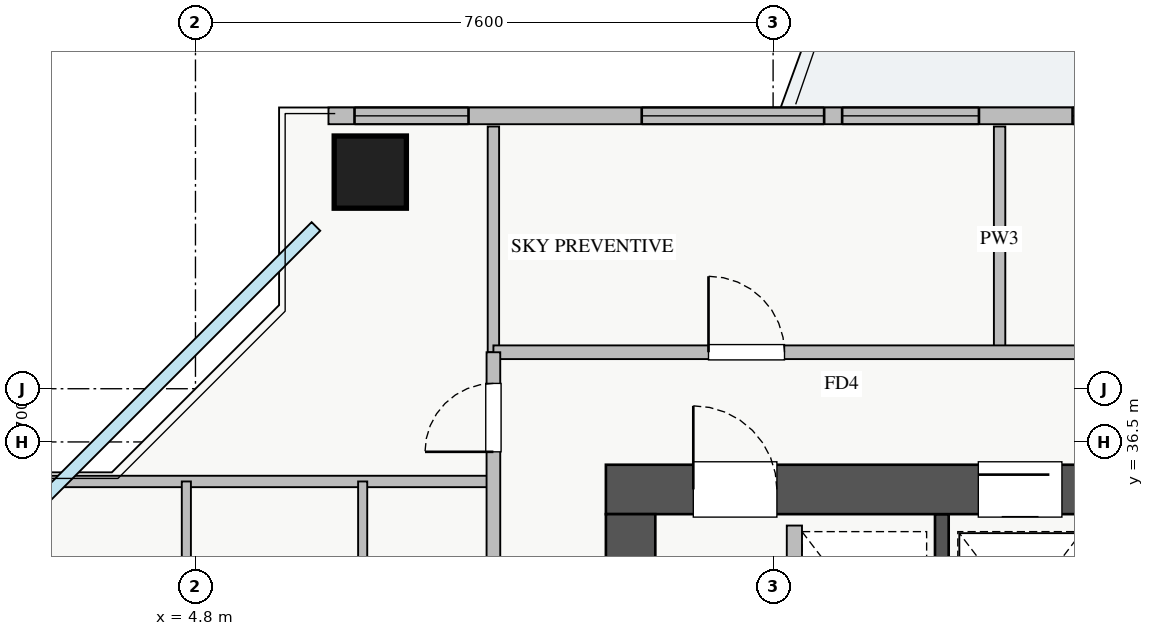
"""IFC4 building model, lengths in metres.
Left out: names, types, materials, properties, quantities, classifications, styles, units other than length and angle.
Written with IfcOpenShell. Run it as: python <this file> out.ifc"""

import sys

from ifc_helpers import new_model, si_unit, direction, frame, frame_2d, origin, origin_2d, place, context, subcontext, project, spatial, rectangle, extrude, source, transform, mapped, element, fill, save


model = new_model("IFC4")
c1 = context("Model", 3, precision=1e-05, world=origin(), true_north=direction((0.0, 1.0)))
c2 = subcontext(c1, "Body", "Model", "MODEL_VIEW")
j1 = project(units=[si_unit("LENGTHUNIT", "METRE"), si_unit("PLANEANGLEUNIT", "RADIAN")], contexts=[c1])
p1 = place(None, origin())
s1 = spatial("IfcSite", under=j1, at=p1, CompositionType="ELEMENT")
p2 = place(p1, origin())
s2 = spatial("IfcBuilding", under=s1, at=p2, CompositionType="ELEMENT")
p3 = place(p2, frame((0.0, 0.0, 179.5)))
s3 = spatial("IfcBuildingStorey", under=s2, at=p3, CompositionType="ELEMENT", Elevation=179.5)
p4 = place(p3, frame((14.62, 33.2, 0.0), z_axis=(0.0, 0.0, 1.0), x_axis=(0.0, 1.0, 0.0)))
e1 = element("IfcWall", 1, at=p4, inside=s3, PredefinedType="SHEAR", context=c2, shape_type="SweptSolid", body=[
    extrude(rectangle(XDim=2.35, YDim=0.18, at=frame_2d((1.175, 0.0))), origin(), (0.0, 0.0, 1.0), 3.07),
])
p5 = place(p3, frame((10.2, 35.875, 0.0), z_axis=(0.0, 0.0, 1.0), x_axis=(1.0, 0.0, 0.0)))
e2 = element("IfcWall", 2, at=p5, inside=s3, PredefinedType="SHEAR", context=c2, shape_type="SweptSolid", body=[
    extrude(rectangle(XDim=17.6, YDim=0.65, at=frame_2d((8.8, 0.0))), origin(), (0.0, 0.0, 1.0), 3.25),
])
p6 = place(p5, frame((1.15, 0.0, 0.0)))
e3 = element("IfcOpeningElement", 3, at=p6, cuts=e2, PredefinedType="OPENING", context=c2, shape_type="SweptSolid", body=[
    extrude(rectangle(XDim=1.1, YDim=2.05, at=frame_2d((0.55, 1.025))), frame((0.0, 0.335, 0.0), z_axis=(0.0, -1.0, 0.0), x_axis=(1.0, 0.0, 0.0)), (0.0, 0.0, 1.0), 0.67),
])
p7 = place(p5, frame((8.3, 0.0, 0.0)))
e4 = element("IfcOpeningElement", 4, at=p7, cuts=e2, PredefinedType="OPENING", context=c2, shape_type="SweptSolid", body=[
    extrude(rectangle(XDim=1.1, YDim=2.05, at=frame_2d((0.55, 1.025))), frame((0.0, 0.335, 0.0), z_axis=(0.0, -1.0, 0.0), x_axis=(1.0, 0.0, 0.0)), (0.0, 0.0, 1.0), 0.67),
])
p8 = place(p5, frame((4.9, 0.0, 0.0)))
e5 = element("IfcOpeningElement", 5, at=p8, cuts=e2, PredefinedType="OPENING", context=c2, shape_type="SweptSolid", body=[
    extrude(rectangle(XDim=1.1, YDim=2.05, at=frame_2d((0.55, 1.025))), frame((0.0, 0.335, 0.0), z_axis=(0.0, -1.0, 0.0), x_axis=(1.0, 0.0, 0.0)), (0.0, 0.0, 1.0), 0.67),
])
p9 = place(p5, frame((14.74, 0.0, 0.0)))
e6 = element("IfcOpeningElement", 6, at=p9, cuts=e2, PredefinedType="OPENING", context=c2, shape_type="SweptSolid", body=[
    extrude(rectangle(XDim=1.0, YDim=2.05, at=frame_2d((0.5, 1.025))), frame((0.0, 0.335, 0.0), z_axis=(0.0, -1.0, 0.0), x_axis=(1.0, 0.0, 0.0)), (0.0, 0.0, 1.0), 0.67),
])
p10 = place(p5, frame((10.25, 0.0, 0.0)))
e7 = element("IfcOpeningElement", 7, at=p10, cuts=e2, PredefinedType="OPENING", context=c2, shape_type="SweptSolid", body=[
    extrude(rectangle(XDim=1.0, YDim=2.05, at=frame_2d((0.5, 1.025))), frame((0.0, 0.335, 0.0), z_axis=(0.0, -1.0, 0.0), x_axis=(1.0, 0.0, 0.0)), (0.0, 0.0, 1.0), 0.67),
])
p11 = place(p5, frame((12.7, 0.0, 0.0)))
e8 = element("IfcOpeningElement", 8, at=p11, cuts=e2, PredefinedType="OPENING", context=c2, shape_type="SweptSolid", body=[
    extrude(rectangle(XDim=1.0, YDim=2.05, at=frame_2d((0.5, 1.025))), frame((0.0, 0.335, 0.0), z_axis=(0.0, -1.0, 0.0), x_axis=(1.0, 0.0, 0.0)), (0.0, 0.0, 1.0), 0.67),
])
p12 = place(p3, frame((10.525, 29.65, 0.0), z_axis=(0.0, 0.0, 1.0), x_axis=(0.0, 1.0, 0.0)))
e9 = element("IfcWall", 9, at=p12, inside=s3, PredefinedType="SHEAR", context=c2, shape_type="SweptSolid", body=[
    extrude(rectangle(XDim=5.9, YDim=0.65, at=frame_2d((2.95, 0.0))), origin(), (0.0, 0.0, 1.0), 3.25),
])
m1 = source(origin(), c2, "Body", "SweptSolid", [
    extrude(rectangle(XDim=0.95, YDim=0.95, at=origin_2d()), origin(), (0.0, 0.0, 1.0), 3.25),
])
p13 = place(p3, frame((7.1, 40.05, 0.0), z_axis=(0.0, 0.0, 1.0), x_axis=(1.0, 0.0, 0.0)))
e10 = element("IfcColumn", 10, at=p13, inside=s3, PredefinedType="COLUMN", context=c2, shape_type="MappedRepresentation", body=[
    mapped(m1, transform((0.0, 0.0, 0.0), x_axis=(1.0, 0.0, 0.0), y_axis=(0.0, 1.0, 0.0), z_axis=(0.0, 0.0, 1.0), scale=1.0)),
])
p14 = place(p3, frame((6.55, 40.79, 0.0), z_axis=(0.0, 0.0, 1.0), x_axis=(1.0, 0.0, 0.0)))
e11 = element("IfcWall", 11, at=p14, inside=s3, PredefinedType="STANDARD", context=c2, shape_type="SweptSolid", body=[
    extrude(rectangle(XDim=24.9, YDim=0.22, at=frame_2d((12.45, 0.0))), origin(), (0.0, 0.0, 1.0), 2.61),
])
p15 = place(p14, frame((13.3, 0.0, 0.0)))
e12 = element("IfcOpeningElement", 12, at=p15, cuts=e11, PredefinedType="OPENING", context=c2, shape_type="SweptSolid", body=[
    extrude(rectangle(XDim=1.2, YDim=2.1, at=frame_2d((0.6, 1.05))), frame((0.0, 0.12, 0.0), z_axis=(0.0, -1.0, 0.0), x_axis=(1.0, 0.0, 0.0)), (0.0, 0.0, 1.0), 0.24),
])
p16 = place(p14, frame((0.343, 0.0, 0.9)))
e13 = element("IfcOpeningElement", 13, at=p16, cuts=e11, PredefinedType="OPENING", context=c2, shape_type="SweptSolid", body=[
    extrude(rectangle(XDim=1.5, YDim=1.5, at=frame_2d((0.75, 0.75))), frame((0.0, 0.12, 0.0), z_axis=(0.0, -1.0, 0.0), x_axis=(1.0, 0.0, 0.0)), (0.0, 0.0, 1.0), 0.24),
])
p17 = place(p14, frame((9.79, 0.0, 0.9)))
e14 = element("IfcOpeningElement", 14, at=p17, cuts=e11, PredefinedType="OPENING", context=c2, shape_type="SweptSolid", body=[
    extrude(rectangle(XDim=1.8, YDim=1.5, at=frame_2d((0.9, 0.75))), frame((0.0, 0.12, 0.0), z_axis=(0.0, -1.0, 0.0), x_axis=(1.0, 0.0, 0.0)), (0.0, 0.0, 1.0), 0.24),
])
p18 = place(p14, frame((14.813, 0.0, 0.9)))
e15 = element("IfcOpeningElement", 15, at=p18, cuts=e11, PredefinedType="OPENING", context=c2, shape_type="SweptSolid", body=[
    extrude(rectangle(XDim=1.5, YDim=1.45, at=frame_2d((0.75, 0.725))), frame((0.0, 0.12, 0.0), z_axis=(0.0, -1.0, 0.0), x_axis=(1.0, 0.0, 0.0)), (0.0, 0.0, 1.0), 0.24),
])
p19 = place(p14, frame((20.738, 0.0, 0.9)))
e16 = element("IfcOpeningElement", 16, at=p19, cuts=e11, PredefinedType="OPENING", context=c2, shape_type="SweptSolid", body=[
    extrude(rectangle(XDim=2.1, YDim=1.48, at=frame_2d((1.05, 0.74))), frame((0.0, 0.12, 0.0), z_axis=(0.0, -1.0, 0.0), x_axis=(1.0, 0.0, 0.0)), (0.0, 0.0, 1.0), 0.24),
])
p20 = place(p14, frame((4.122, 0.0, 0.9)))
e17 = element("IfcOpeningElement", 17, at=p20, cuts=e11, PredefinedType="OPENING", context=c2, shape_type="SweptSolid", body=[
    extrude(rectangle(XDim=2.4, YDim=1.5, at=frame_2d((1.2, 0.75))), frame((0.0, 0.12, 0.0), z_axis=(0.0, -1.0, 0.0), x_axis=(1.0, 0.0, 0.0)), (0.0, 0.0, 1.0), 0.24),
])
p21 = place(p14, frame((6.758, 0.0, 0.9)))
e18 = element("IfcOpeningElement", 18, at=p21, cuts=e11, PredefinedType="OPENING", context=c2, shape_type="SweptSolid", body=[
    extrude(rectangle(XDim=1.8, YDim=1.5, at=frame_2d((0.9, 0.75))), frame((0.0, 0.12, 0.0), z_axis=(0.0, -1.0, 0.0), x_axis=(1.0, 0.0, 0.0)), (0.0, 0.0, 1.0), 0.24),
])
p22 = place(p3, frame((12.68, 33.19, 0.0), z_axis=(0.0, 0.0, 1.0), x_axis=(0.0, 1.0, 0.0)))
e19 = element("IfcWall", 19, at=p22, inside=s3, PredefinedType="PARTITIONING", context=c2, shape_type="SweptSolid", body=[
    extrude(rectangle(XDim=2.21, YDim=0.2, at=frame_2d((1.105, 0.0))), origin(), (0.0, 0.0, 1.0), 3.07),
])
for number, where, z_axis, x_axis in (
    (20, (15.38, 37.68, 0.0), (0.0, 0.0, 1.0), (0.0, 1.0, 0.0)),
    (21, (8.72, 37.68, 0.0), (0.0, 0.0, 1.0), (0.0, 1.0, 0.0)),
):
    element("IfcWall", number, at=place(p3, frame(where, z_axis=z_axis, x_axis=x_axis)), inside=s3, PredefinedType="PARTITIONING", context=c2, shape_type="SweptSolid", body=[
        extrude(rectangle(XDim=2.97, YDim=0.15, at=frame_2d((1.485, 0.0))), origin(), (0.0, 0.0, 1.0), 3.07),
    ])
p23 = place(p3, frame((8.72, 37.68, 0.0), z_axis=(0.0, 0.0, 1.0), x_axis=(1.0, 0.0, 0.0)))
e22 = element("IfcWall", 22, at=p23, inside=s3, PredefinedType="PARTITIONING", context=c2, shape_type="SweptSolid", body=[
    extrude(rectangle(XDim=23.63, YDim=0.18, at=frame_2d((11.815, 0.0))), origin(), (0.0, 0.0, 1.0), 3.07),
])
p24 = place(p23, frame((2.83, 0.0, 0.0)))
e23 = element("IfcOpeningElement", 23, at=p24, cuts=e22, PredefinedType="OPENING", context=c2, shape_type="SweptSolid", body=[
    extrude(rectangle(XDim=1.0, YDim=2.05, at=frame_2d((0.5, 1.025))), frame((0.0, 0.1, 0.0), z_axis=(0.0, -1.0, 0.0), x_axis=(1.0, 0.0, 0.0)), (0.0, 0.0, 1.0), 0.2),
])
p25 = place(p23, frame((8.02, 0.0, 0.0)))
e24 = element("IfcOpeningElement", 24, at=p25, cuts=e22, PredefinedType="OPENING", context=c2, shape_type="SweptSolid", body=[
    extrude(rectangle(XDim=1.0, YDim=2.05, at=frame_2d((0.5, 1.025))), frame((0.0, 0.1, 0.0), z_axis=(0.0, -1.0, 0.0), x_axis=(1.0, 0.0, 0.0)), (0.0, 0.0, 1.0), 0.2),
])
p26 = place(p23, frame((13.41, 0.0, 0.0)))
e25 = element("IfcOpeningElement", 25, at=p26, cuts=e22, PredefinedType="OPENING", context=c2, shape_type="SweptSolid", body=[
    extrude(rectangle(XDim=1.0, YDim=2.05, at=frame_2d((0.5, 1.025))), frame((0.0, 0.1, 0.0), z_axis=(0.0, -1.0, 0.0), x_axis=(1.0, 0.0, 0.0)), (0.0, 0.0, 1.0), 0.2),
])
p27 = place(p23, frame((19.85, 0.0, 0.0)))
e26 = element("IfcOpeningElement", 26, at=p27, cuts=e22, PredefinedType="OPENING", context=c2, shape_type="SweptSolid", body=[
    extrude(rectangle(XDim=1.0, YDim=2.05, at=frame_2d((0.5, 1.025))), frame((0.0, 0.1, 0.0), z_axis=(0.0, -1.0, 0.0), x_axis=(1.0, 0.0, 0.0)), (0.0, 0.0, 1.0), 0.2),
])
p28 = place(p3, frame((1.35, 35.98, 0.0), z_axis=(0.0, 0.0, 1.0), x_axis=(1.0, 0.0, 0.0)))
e27 = element("IfcWall", 27, at=p28, inside=s3, PredefinedType="PARTITIONING", context=c2, shape_type="SweptSolid", body=[
    extrude(rectangle(XDim=7.37, YDim=0.15, at=frame_2d((3.685, 0.0))), origin(), (0.0, 0.0, 1.0), 3.07),
])
p29 = place(p3, frame((4.68, 32.56, 0.0), z_axis=(0.0, 0.0, 1.0), x_axis=(0.0, 1.0, 0.0)))
e28 = element("IfcWall", 28, at=p29, inside=s3, PredefinedType="PLUMBINGWALL", context=c2, shape_type="SweptSolid", body=[
    extrude(rectangle(XDim=3.42, YDim=0.12, at=frame_2d((1.71, 0.0))), origin(), (0.0, 0.0, 1.0), 3.07),
])
p30 = place(p3, frame((7.0, 32.56, 0.0), z_axis=(0.0, 0.0, 1.0), x_axis=(0.0, 1.0, 0.0)))
e29 = element("IfcWall", 29, at=p30, inside=s3, PredefinedType="PLUMBINGWALL", context=c2, shape_type="SweptSolid", body=[
    extrude(rectangle(XDim=3.42, YDim=0.12, at=frame_2d((1.71, 0.0))), origin(), (0.0, 0.0, 1.0), 2.565),
])
p31 = place(p3, frame((8.72, 8.31, 0.0), z_axis=(0.0, 0.0, 1.0), x_axis=(0.0, 1.0, 0.0)))
e30 = element("IfcWall", 30, at=p31, inside=s3, PredefinedType="PARTITIONING", context=c2, shape_type="SweptSolid", body=[
    extrude(rectangle(XDim=29.37, YDim=0.18, at=frame_2d((14.685, 0.0))), origin(), (0.0, 0.0, 1.0), 3.07),
])
p32 = place(p31, frame((28.06, 0.0, 0.0)))
e31 = element("IfcOpeningElement", 31, at=p32, cuts=e30, PredefinedType="OPENING", context=c2, shape_type="SweptSolid", body=[
    extrude(rectangle(XDim=0.9, YDim=2.05, at=frame_2d((0.45, 1.025))), frame((0.0, 0.1, 0.0), z_axis=(0.0, -1.0, 0.0), x_axis=(1.0, 0.0, 0.0)), (0.0, 0.0, 1.0), 0.2),
])
p33 = place(p31, frame((0.24, 0.0, 0.0)))
e32 = element("IfcOpeningElement", 32, at=p33, cuts=e30, PredefinedType="OPENING", context=c2, shape_type="SweptSolid", body=[
    extrude(rectangle(XDim=0.9, YDim=2.05, at=frame_2d((0.45, 1.025))), frame((0.0, 0.1, 0.0), z_axis=(0.0, -1.0, 0.0), x_axis=(1.0, 0.0, 0.0)), (0.0, 0.0, 1.0), 0.2),
])
p34 = place(p31, frame((2.25, 0.0, 0.0)))
e33 = element("IfcOpeningElement", 33, at=p34, cuts=e30, PredefinedType="OPENING", context=c2, shape_type="SweptSolid", body=[
    extrude(rectangle(XDim=1.0, YDim=2.05, at=frame_2d((0.5, 1.025))), frame((0.0, 0.1, 0.0), z_axis=(0.0, -1.0, 0.0), x_axis=(1.0, 0.0, 0.0)), (0.0, 0.0, 1.0), 0.2),
])
p35 = place(p31, frame((7.935, 0.0, 0.0)))
e34 = element("IfcOpeningElement", 34, at=p35, cuts=e30, PredefinedType="OPENING", context=c2, shape_type="SweptSolid", body=[
    extrude(rectangle(XDim=1.0, YDim=2.05, at=frame_2d((0.5, 1.025))), frame((0.0, 0.1, 0.0), z_axis=(0.0, -1.0, 0.0), x_axis=(1.0, 0.0, 0.0)), (0.0, 0.0, 1.0), 0.2),
])
p36 = place(p31, frame((17.3, 0.0, 0.0)))
e35 = element("IfcOpeningElement", 35, at=p36, cuts=e30, PredefinedType="OPENING", context=c2, shape_type="SweptSolid", body=[
    extrude(rectangle(XDim=1.0, YDim=2.05, at=frame_2d((0.5, 1.025))), frame((0.0, 0.1, 0.0), z_axis=(0.0, -1.0, 0.0), x_axis=(1.0, 0.0, 0.0)), (0.0, 0.0, 1.0), 0.2),
])
p37 = place(p31, frame((21.98, 0.0, 0.0)))
e36 = element("IfcOpeningElement", 36, at=p37, cuts=e30, PredefinedType="OPENING", context=c2, shape_type="SweptSolid", body=[
    extrude(rectangle(XDim=1.0, YDim=2.05, at=frame_2d((0.5, 1.025))), frame((0.0, 0.1, 0.0), z_axis=(0.0, -1.0, 0.0), x_axis=(1.0, 0.0, 0.0)), (0.0, 0.0, 1.0), 0.2),
])
m2 = source(origin(), c2, "Body", "SweptSolid", [
    extrude(rectangle(XDim=1.5, YDim=1.5, at=frame_2d((0.75, 0.75))), frame((0.0, 0.03, 0.0), z_axis=(0.0, -1.0, 0.0), x_axis=(1.0, 0.0, 0.0)), (0.0, 0.0, 1.0), 0.06),
])
p38 = place(p16, origin())
e37 = element("IfcWindow", 37, at=p38, inside=s3, PartitioningType="TRIPLE_PANEL_VERTICAL", PredefinedType="WINDOW", context=c2, shape_type="MappedRepresentation", body=[
    mapped(m2, transform((0.0, 0.0, 0.0), x_axis=(1.0, 0.0, 0.0), y_axis=(0.0, 1.0, 0.0), z_axis=(0.0, 0.0, 1.0), scale=1.0)),
])
fill(e13, e37)
m3 = source(origin(), c2, "Body", "SweptSolid", [
    extrude(rectangle(XDim=1.8, YDim=1.5, at=frame_2d((0.9, 0.75))), frame((0.0, 0.03, 0.0), z_axis=(0.0, -1.0, 0.0), x_axis=(1.0, 0.0, 0.0)), (0.0, 0.0, 1.0), 0.06),
])
p39 = place(p17, origin())
e38 = element("IfcWindow", 38, at=p39, inside=s3, PartitioningType="DOUBLE_PANEL_VERTICAL", PredefinedType="WINDOW", context=c2, shape_type="MappedRepresentation", body=[
    mapped(m3, transform((0.0, 0.0, 0.0), x_axis=(1.0, 0.0, 0.0), y_axis=(0.0, 1.0, 0.0), z_axis=(0.0, 0.0, 1.0), scale=1.0)),
])
fill(e14, e38)
m4 = source(origin(), c2, "Body", "SweptSolid", [
    extrude(rectangle(XDim=1.1, YDim=2.05, at=frame_2d((0.55, 1.025))), frame((0.0, 0.025, 0.0), z_axis=(0.0, -1.0, 0.0), x_axis=(1.0, 0.0, 0.0)), (0.0, 0.0, 1.0), 0.05),
])
p40 = place(p6, origin())
e39 = element("IfcDoor", 39, at=p40, inside=s3, OperationType="SINGLE_SWING_LEFT", PredefinedType="DOOR", context=c2, shape_type="MappedRepresentation", body=[
    mapped(m4, transform((0.0, 0.0, 0.0), x_axis=(1.0, 0.0, 0.0), y_axis=(0.0, 1.0, 0.0), z_axis=(0.0, 0.0, 1.0), scale=1.0)),
])
fill(e3, e39)
p41 = place(p8, origin())
e40 = element("IfcDoor", 40, at=p41, inside=s3, OperationType="SLIDING_TO_LEFT", PredefinedType="DOOR", context=c2, shape_type="MappedRepresentation", body=[
    mapped(m4, transform((0.0, 0.0, 0.0), x_axis=(1.0, 0.0, 0.0), y_axis=(0.0, 1.0, 0.0), z_axis=(0.0, 0.0, 1.0), scale=1.0)),
])
fill(e5, e40)
m5 = source(origin(), c2, "Body", "SweptSolid", [
    extrude(rectangle(XDim=1.0, YDim=2.05, at=frame_2d((0.5, 1.025))), frame((0.0, 0.025, 0.0), z_axis=(0.0, -1.0, 0.0), x_axis=(1.0, 0.0, 0.0)), (0.0, 0.0, 1.0), 0.05),
])
p42 = place(p24, origin())
e41 = element("IfcDoor", 41, at=p42, inside=s3, OperationType="SINGLE_SWING_LEFT", PredefinedType="DOOR", context=c2, shape_type="MappedRepresentation", body=[
    mapped(m5, transform((0.0, 0.0, 0.0), x_axis=(1.0, 0.0, 0.0), y_axis=(0.0, 1.0, 0.0), z_axis=(0.0, 0.0, 1.0), scale=1.0)),
])
fill(e23, e41)
m6 = source(origin(), c2, "Body", "SweptSolid", [
    extrude(rectangle(XDim=0.9, YDim=2.05, at=frame_2d((0.45, 1.025))), frame((0.0, 0.025, 0.0), z_axis=(0.0, -1.0, 0.0), x_axis=(1.0, 0.0, 0.0)), (0.0, 0.0, 1.0), 0.05),
])
p43 = place(p32, origin())
e42 = element("IfcDoor", 42, at=p43, inside=s3, OperationType="SINGLE_SWING_LEFT", PredefinedType="DOOR", context=c2, shape_type="MappedRepresentation", body=[
    mapped(m6, transform((0.0, 0.0, 0.0), x_axis=(1.0, 0.0, 0.0), y_axis=(0.0, 1.0, 0.0), z_axis=(0.0, 0.0, 1.0), scale=1.0)),
])
fill(e31, e42)
m7 = source(origin(), c2, "Body", "SweptSolid", [
    extrude(rectangle(XDim=2.4, YDim=1.5, at=frame_2d((1.2, 0.75))), frame((0.0, 0.03, 0.0), z_axis=(0.0, -1.0, 0.0), x_axis=(1.0, 0.0, 0.0)), (0.0, 0.0, 1.0), 0.06),
])
p44 = place(p20, origin())
e43 = element("IfcWindow", 43, at=p44, inside=s3, PartitioningType="TRIPLE_PANEL_VERTICAL", PredefinedType="WINDOW", context=c2, shape_type="MappedRepresentation", body=[
    mapped(m7, transform((0.0, 0.0, 0.0), x_axis=(1.0, 0.0, 0.0), y_axis=(0.0, 1.0, 0.0), z_axis=(0.0, 0.0, 1.0), scale=1.0)),
])
fill(e17, e43)
p45 = place(p21, origin())
e44 = element("IfcWindow", 44, at=p45, inside=s3, PartitioningType="DOUBLE_PANEL_VERTICAL", PredefinedType="WINDOW", context=c2, shape_type="MappedRepresentation", body=[
    mapped(m3, transform((0.0, 0.0, 0.0), x_axis=(1.0, 0.0, 0.0), y_axis=(0.0, 1.0, 0.0), z_axis=(0.0, 0.0, 1.0), scale=1.0)),
])
fill(e18, e44)
save(model, sys.argv[1])
